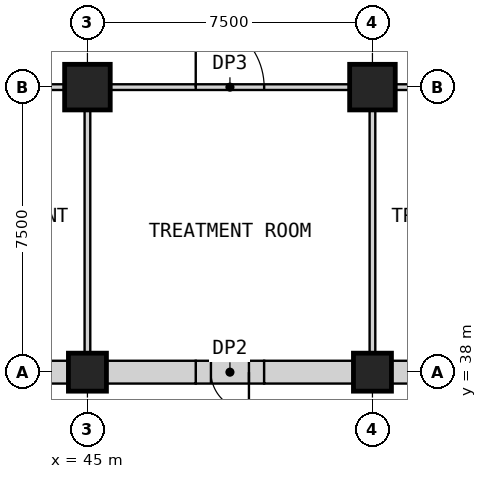
"""IFC4 building model, lengths in metres.
Left out: names, types, materials, properties, quantities, classifications, styles, units other than length and angle.
Written with IfcOpenShell. Run it as: python <this file> out.ifc"""

import sys

from ifc_helpers import new_model, si_unit, direction, frame, frame_2d, origin, origin_2d, place, context, subcontext, project, spatial, rectangle, extrude, element, fill, save


model = new_model("IFC4")
c1 = context("Model", 3, precision=1e-05, world=origin(), true_north=direction((0.0, 1.0)))
c2 = subcontext(c1, "Body", "Model", "MODEL_VIEW")
j1 = project(units=[si_unit("LENGTHUNIT", "METRE"), si_unit("PLANEANGLEUNIT", "RADIAN")], contexts=[c1])
p1 = place(None, origin())
s1 = spatial("IfcSite", under=j1, at=p1, CompositionType="ELEMENT")
p2 = place(p1, origin())
s2 = spatial("IfcBuilding", under=s1, at=p2, CompositionType="ELEMENT")
p3 = place(p2, frame((0.0, 0.0, 29.0)))
s3 = spatial("IfcBuildingStorey", under=s2, at=p3, CompositionType="ELEMENT", Elevation=29.0)
p4 = place(p3, frame((45.0, 38.0, 0.0), z_axis=(0.0, 0.0, 1.0), x_axis=(1.0, 0.0, 0.0)))
e1 = element("IfcColumn", 1, at=p4, inside=s3, PredefinedType="COLUMN", context=c2, shape_type="SweptSolid", body=[
    extrude(rectangle(XDim=1.0, YDim=1.0, at=origin_2d()), origin(), (0.0, 0.0, 1.0), 5.0),
])
p5 = place(p3, frame((45.0, 45.5, 0.0), z_axis=(0.0, 0.0, 1.0), x_axis=(1.0, 0.0, 0.0)))
e2 = element("IfcColumn", 2, at=p5, inside=s3, PredefinedType="COLUMN", context=c2, shape_type="SweptSolid", body=[
    extrude(rectangle(XDim=1.2, YDim=1.2, at=origin_2d()), origin(), (0.0, 0.0, 1.0), 5.0),
])
p6 = place(p3, frame((52.5, 38.0, 0.0), z_axis=(0.0, 0.0, 1.0), x_axis=(1.0, 0.0, 0.0)))
e3 = element("IfcColumn", 3, at=p6, inside=s3, PredefinedType="COLUMN", context=c2, shape_type="SweptSolid", body=[
    extrude(rectangle(XDim=1.0, YDim=1.0, at=origin_2d()), origin(), (0.0, 0.0, 1.0), 5.0),
])
p7 = place(p3, frame((52.5, 45.5, 0.0), z_axis=(0.0, 0.0, 1.0), x_axis=(1.0, 0.0, 0.0)))
e4 = element("IfcColumn", 4, at=p7, inside=s3, PredefinedType="COLUMN", context=c2, shape_type="SweptSolid", body=[
    extrude(rectangle(XDim=1.2, YDim=1.2, at=origin_2d()), origin(), (0.0, 0.0, 1.0), 5.0),
])
p8 = place(p3, frame((41.325, 45.5, 0.0), z_axis=(0.0, 0.0, 1.0), x_axis=(1.0, 0.0, 0.0)))
e5 = element("IfcWall", 5, at=p8, inside=s3, PredefinedType="PARTITIONING", context=c2, shape_type="SweptSolid", body=[
    extrude(rectangle(XDim=3.075, YDim=0.15, at=frame_2d((1.538, 0.0))), origin(), (0.0, 0.0, 1.0), 4.7),
])
p9 = place(p8, frame((0.75, 0.0, 0.0)))
e6 = element("IfcOpeningElement", 6, at=p9, cuts=e5, PredefinedType="OPENING", context=c2, shape_type="SweptSolid", body=[
    extrude(rectangle(XDim=1.8, YDim=2.4, at=frame_2d((0.9, 1.2))), frame((0.0, 0.085, 0.0), z_axis=(0.0, -1.0, 0.0), x_axis=(1.0, 0.0, 0.0)), (0.0, 0.0, 1.0), 0.17),
])
p10 = place(p3, frame((45.6, 45.5, 0.0), z_axis=(0.0, 0.0, 1.0), x_axis=(1.0, 0.0, 0.0)))
e7 = element("IfcWall", 7, at=p10, inside=s3, PredefinedType="PARTITIONING", context=c2, shape_type="SweptSolid", body=[
    extrude(rectangle(XDim=6.3, YDim=0.15, at=frame_2d((3.15, 0.0))), origin(), (0.0, 0.0, 1.0), 4.7),
])
p11 = place(p10, frame((2.25, 0.0, 0.0)))
e8 = element("IfcOpeningElement", 8, at=p11, cuts=e7, PredefinedType="OPENING", context=c2, shape_type="SweptSolid", body=[
    extrude(rectangle(XDim=1.8, YDim=2.4, at=frame_2d((0.9, 1.2))), frame((0.0, 0.085, 0.0), z_axis=(0.0, -1.0, 0.0), x_axis=(1.0, 0.0, 0.0)), (0.0, 0.0, 1.0), 0.17),
])
p12 = place(p3, frame((53.1, 45.5, 0.0), z_axis=(0.0, 0.0, 1.0), x_axis=(1.0, 0.0, 0.0)))
e9 = element("IfcWall", 9, at=p12, inside=s3, PredefinedType="PARTITIONING", context=c2, shape_type="SweptSolid", body=[
    extrude(rectangle(XDim=3.075, YDim=0.15, at=frame_2d((1.538, 0.0))), origin(), (0.0, 0.0, 1.0), 4.7),
])
p13 = place(p12, frame((0.5, 0.0, 0.0)))
e10 = element("IfcOpeningElement", 10, at=p13, cuts=e9, PredefinedType="OPENING", context=c2, shape_type="SweptSolid", body=[
    extrude(rectangle(XDim=1.8, YDim=2.4, at=frame_2d((0.9, 1.2))), frame((0.0, 0.085, 0.0), z_axis=(0.0, -1.0, 0.0), x_axis=(1.0, 0.0, 0.0)), (0.0, 0.0, 1.0), 0.17),
])
p14 = place(p3, frame((43.9, 38.0, 0.0), z_axis=(0.0, 0.0, 1.0), x_axis=(1.0, 0.0, 0.0)))
e11 = element("IfcWall", 11, at=p14, inside=s3, PredefinedType="PARTITIONING", context=c2, shape_type="SweptSolid", body=[
    extrude(rectangle(XDim=0.6, YDim=0.6, at=frame_2d((0.3, 0.0))), origin(), (0.0, 0.0, 1.0), 4.25),
])
p15 = place(p3, frame((49.65, 38.0, 0.0), z_axis=(0.0, 0.0, 1.0), x_axis=(-1.0, 0.0, 0.0)))
e12 = element("IfcWall", 12, at=p15, inside=s3, PredefinedType="PARTITIONING", context=c2, shape_type="SweptSolid", body=[
    extrude(rectangle(XDim=1.8, YDim=0.6, at=frame_2d((0.9, 0.0))), origin(), (0.0, 0.0, 1.0), 4.25),
])
p16 = place(p15, frame((0.4, 0.0, 0.0)))
e13 = element("IfcOpeningElement", 13, at=p16, cuts=e12, PredefinedType="OPENING", context=c2, shape_type="SweptSolid", body=[
    extrude(rectangle(XDim=1.0, YDim=2.1, at=frame_2d((0.5, 1.05))), frame((0.0, 0.31, 0.0), z_axis=(0.0, -1.0, 0.0), x_axis=(1.0, 0.0, 0.0)), (0.0, 0.0, 1.0), 0.62),
])
for number, where, z_axis, x_axis in (
    (14, (45.5, 38.0, 0.0), (0.0, 0.0, 1.0), (1.0, 0.0, 0.0)),
    (15, (49.65, 38.0, 0.0), (0.0, 0.0, 1.0), (1.0, 0.0, 0.0)),
):
    element("IfcWall", number, at=place(p3, frame(where, z_axis=z_axis, x_axis=x_axis)), inside=s3, PredefinedType="PARTITIONING", context=c2, shape_type="SweptSolid", body=[
        extrude(rectangle(XDim=2.35, YDim=0.6, at=frame_2d((1.175, 0.0))), origin(), (0.0, 0.0, 1.0), 4.25),
    ])
p17 = place(p3, frame((55.15, 38.0, 0.0), z_axis=(0.0, 0.0, 1.0), x_axis=(-1.0, 0.0, 0.0)))
e16 = element("IfcWall", 16, at=p17, inside=s3, PredefinedType="PARTITIONING", context=c2, shape_type="SweptSolid", body=[
    extrude(rectangle(XDim=2.15, YDim=0.6, at=frame_2d((1.075, 0.0))), origin(), (0.0, 0.0, 1.0), 4.25),
])
p18 = place(p17, frame((0.4, 0.0, 0.0)))
e17 = element("IfcOpeningElement", 17, at=p18, cuts=e16, PredefinedType="OPENING", context=c2, shape_type="SweptSolid", body=[
    extrude(rectangle(XDim=1.0, YDim=2.1, at=frame_2d((0.5, 1.05))), frame((0.0, 0.31, 0.0), z_axis=(0.0, -1.0, 0.0), x_axis=(1.0, 0.0, 0.0)), (0.0, 0.0, 1.0), 0.62),
])
for number, where, z_axis, x_axis in (
    (18, (45.0, 38.5, 0.0), (0.0, 0.0, 1.0), (0.0, 1.0, 0.0)),
    (19, (52.5, 38.5, 0.0), (0.0, 0.0, 1.0), (0.0, 1.0, 0.0)),
):
    element("IfcWall", number, at=place(p3, frame(where, z_axis=z_axis, x_axis=x_axis)), inside=s3, PredefinedType="PARTITIONING", context=c2, shape_type="SweptSolid", body=[
        extrude(rectangle(XDim=6.4, YDim=0.15, at=frame_2d((3.2, 0.0))), origin(), (0.0, 0.0, 1.0), 4.7),
    ])
p19 = place(p11, origin())
e20 = element("IfcDoor", 20, at=p19, inside=s3, OperationType="SINGLE_SWING_LEFT", PredefinedType="DOOR", context=c2, shape_type="SweptSolid", body=[
    extrude(rectangle(XDim=1.8, YDim=2.4, at=frame_2d((0.9, 1.2))), frame((0.0, 0.025, 0.0), z_axis=(0.0, -1.0, 0.0), x_axis=(1.0, 0.0, 0.0)), (0.0, 0.0, 1.0), 0.05),
])
fill(e8, e20)
p20 = place(p16, origin())
e21 = element("IfcDoor", 21, at=p20, inside=s3, OperationType="SINGLE_SWING_LEFT", PredefinedType="DOOR", context=c2, shape_type="SweptSolid", body=[
    extrude(rectangle(XDim=1.0, YDim=2.1, at=frame_2d((0.5, 1.05))), frame((0.0, 0.025, 0.0), z_axis=(0.0, -1.0, 0.0), x_axis=(1.0, 0.0, 0.0)), (0.0, 0.0, 1.0), 0.05),
])
fill(e13, e21)
save(model, sys.argv[1])
